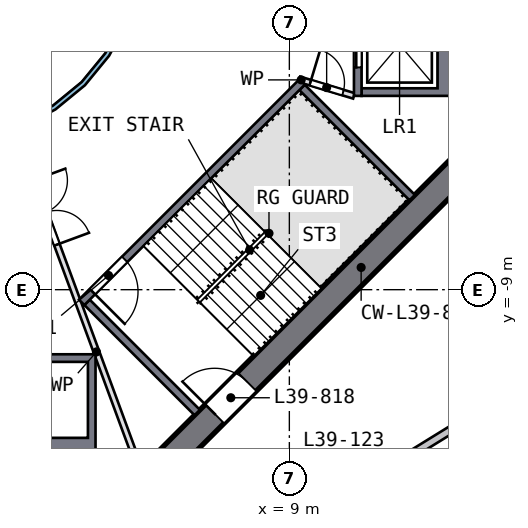
"""IFC4 building model, lengths in metres.
Left out: names, types, materials, properties, quantities, classifications, styles, units other than length and angle.
Written with IfcOpenShell. Run it as: python <this file> out.ifc"""

import sys

from ifc_helpers import new_model, si_unit, direction, frame, frame_2d, origin, place, context, subcontext, project, spatial, polyline, rectangle, outline, extrude, element, fill, save


model = new_model("IFC4")
c1 = context("Model", 3, precision=1e-05, world=origin(), true_north=direction((0.0, 1.0)))
c2 = subcontext(c1, "Body", "Model", "MODEL_VIEW")
j1 = project(units=[si_unit("LENGTHUNIT", "METRE"), si_unit("PLANEANGLEUNIT", "RADIAN")], contexts=[c1])
p1 = place(None, origin())
s1 = spatial("IfcSite", under=j1, at=p1, CompositionType="ELEMENT")
p2 = place(p1, origin())
s2 = spatial("IfcBuilding", under=s1, at=p2, CompositionType="ELEMENT")
p3 = place(p2, frame((0.0, 0.0, 162.0)))
s3 = spatial("IfcBuildingStorey", under=s2, at=p3, CompositionType="ELEMENT", Elevation=162.0)
p4 = place(p3, frame((5.552, -13.752, 0.0), z_axis=(0.0, 0.0, 1.0), x_axis=(0.707106781, 0.707106781, 0.0)))
e1 = element("IfcWall", 1, at=p4, inside=s3, PredefinedType="SHEAR", context=c2, shape_type="SweptSolid", body=[
    extrude(rectangle(XDim=11.598, YDim=0.7, at=frame_2d((5.799, 0.0))), origin(), (0.0, 0.0, 1.0), 3.5),
])
p5 = place(p4, frame((2.099, 0.0, 0.0)))
e2 = element("IfcOpeningElement", 2, at=p5, cuts=e1, PredefinedType="OPENING", context=c2, shape_type="SweptSolid", body=[
    extrude(rectangle(XDim=1.2, YDim=2.1, at=frame_2d((0.6, 1.05))), frame((0.0, 0.36, 0.0), z_axis=(0.0, -1.0, 0.0), x_axis=(1.0, 0.0, 0.0)), (0.0, 0.0, 1.0), 0.72),
])
p6 = place(p3, origin())
e3 = element("IfcWall", 3, at=p6, inside=s3, PredefinedType="SOLIDWALL", context=c2, shape_type="SweptSolid", body=[
    extrude(outline(polyline([(13.3, -3.9), (10.9, -3.9), (10.9, -3.7), (12.9, -3.7), (12.9, -1.4), (10.9, -1.4), (10.9, -1.2), (13.3, -1.2), (13.3, -3.9)])), origin(), (0.0, 0.0, 1.0), 3.19),
])
p7 = place(p3, frame((10.8, -1.2, 0.0), z_axis=(0.0, 0.0, 1.0), x_axis=(0.0, -1.0, 0.0)))
e4 = element("IfcWall", 4, at=p7, inside=s3, PredefinedType="SOLIDWALL", context=c2, shape_type="SweptSolid", body=[
    extrude(rectangle(XDim=2.7, YDim=0.2, at=frame_2d((1.35, 0.0))), origin(), (0.0, 0.0, 1.0), 3.19),
])
p8 = place(p7, frame((0.75, 0.0, 0.0)))
e5 = element("IfcOpeningElement", 5, at=p8, cuts=e4, PredefinedType="OPENING", context=c2, shape_type="SweptSolid", body=[
    extrude(rectangle(XDim=1.2, YDim=2.1, at=frame_2d((0.6, 1.05))), frame((0.0, 0.11, 0.0), z_axis=(0.0, -1.0, 0.0), x_axis=(1.0, 0.0, 0.0)), (0.0, 0.0, 1.0), 0.22),
])
p9 = place(p3, origin())
e6 = element("IfcWall", 6, at=p9, inside=s3, PredefinedType="SOLIDWALL", context=c2, shape_type="SweptSolid", body=[
    extrude(outline(polyline([(3.9, -10.7), (3.9, -13.3), (1.2, -13.3), (1.2, -10.7), (3.9, -10.7)]), holes=[polyline([(1.4, -12.9), (3.7, -12.9), (3.7, -10.9), (1.4, -10.9), (1.4, -12.9)])]), origin(), (0.0, 0.0, 1.0), 3.19),
])
p10 = place(p3, frame((9.334, -3.535, 0.0), z_axis=(0.0, 0.0, 1.0), x_axis=(-0.707106781, -0.707106781, 0.0)))
e7 = element("IfcWall", 7, at=p10, inside=s3, PredefinedType="SOLIDWALL", context=c2, shape_type="SweptSolid", body=[
    extrude(rectangle(XDim=8.2, YDim=0.2, at=frame_2d((4.1, 0.0))), origin(), (0.0, 0.0, 1.0), 3.19),
])
p11 = place(p10, frame((6.6, 0.0, 0.0)))
e8 = element("IfcOpeningElement", 8, at=p11, cuts=e7, PredefinedType="OPENING", context=c2, shape_type="SweptSolid", body=[
    extrude(rectangle(XDim=1.2, YDim=2.1, at=frame_2d((0.6, 1.05))), frame((0.0, 0.11, 0.0), z_axis=(0.0, -1.0, 0.0), x_axis=(1.0, 0.0, 0.0)), (0.0, 0.0, 1.0), 0.22),
])
for number, where, z_axis, x_axis in (
    (9, (3.677, -9.334, 0.0), (0.0, 0.0, 1.0), (0.707, -0.707, 0.0)),
    (10, (9.334, -3.677, 0.0), (0.0, 0.0, 1.0), (0.707, -0.707, 0.0)),
):
    element("IfcWall", number, at=place(p3, frame(where, z_axis=z_axis, x_axis=x_axis)), inside=s3, PredefinedType="SOLIDWALL", context=c2, shape_type="SweptSolid", body=[
        extrude(rectangle(XDim=4.1, YDim=0.2, at=frame_2d((2.05, 0.0))), origin(), (0.0, 0.0, 1.0), 3.19),
    ])
p12 = place(p3, frame((9.263, -3.465, 0.0), z_axis=(0.0, 0.0, 1.0), x_axis=(0.957084567, -0.289808785, 0.0)))
e11 = element("IfcWall", 11, at=p12, inside=s3, PredefinedType="PARTITIONING", context=c2, shape_type="SweptSolid", body=[
    extrude(rectangle(XDim=1.501, YDim=0.15, at=frame_2d((0.75, 0.0))), origin(), (0.0, 0.0, 1.0), 3.19),
])
p13 = place(p12, frame((0.301, 0.0, 0.0)))
e12 = element("IfcOpeningElement", 12, at=p13, cuts=e11, PredefinedType="OPENING", context=c2, shape_type="SweptSolid", body=[
    extrude(rectangle(XDim=0.9, YDim=2.1, at=frame_2d((0.45, 1.05))), frame((0.0, 0.085, 0.0), z_axis=(0.0, -1.0, 0.0), x_axis=(1.0, 0.0, 0.0)), (0.0, 0.0, 1.0), 0.17),
])
p14 = place(p3, frame((1.776, -4.813, 0.0), z_axis=(0.0, 0.0, 1.0), x_axis=(0.346109381, -0.938194168, 0.0)))
e13 = element("IfcWall", 13, at=p14, inside=s3, PredefinedType="PARTITIONING", context=c2, shape_type="SweptSolid", body=[
    extrude(rectangle(XDim=9.016, YDim=0.15, at=frame_2d((4.508, 0.0))), origin(), (0.0, 0.0, 1.0), 3.19),
])
p15 = place(p14, frame((1.4, 0.0, 0.0)))
e14 = element("IfcOpeningElement", 14, at=p15, cuts=e13, PredefinedType="OPENING", context=c2, shape_type="SweptSolid", body=[
    extrude(rectangle(XDim=1.8, YDim=2.1, at=frame_2d((0.9, 1.05))), frame((0.0, 0.085, 0.0), z_axis=(0.0, -1.0, 0.0), x_axis=(1.0, 0.0, 0.0)), (0.0, 0.0, 1.0), 0.17),
])
p16 = place(p3, origin())
e15 = element("IfcWall", 15, at=p16, inside=s3, PredefinedType="SOLIDWALL", context=c2, shape_type="SweptSolid", body=[
    extrude(outline(polyline([(5.021, -0.999), (4.73, -1.959), (4.257, -2.844), (3.62, -3.62), (2.844, -4.257), (1.959, -4.73), (0.999, -5.021), (0.0, -5.12), (-0.999, -5.021), (-1.959, -4.73), (-2.844, -4.257), (-3.62, -3.62), (-4.257, -2.844), (-4.73, -1.959), (-5.021, -0.999), (-5.12, 0.0), (-5.021, 0.999), (-4.73, 1.959), (-4.257, 2.844), (-3.62, 3.62), (-2.844, 4.257), (-1.959, 4.73), (-0.999, 5.021), (0.0, 5.12), (0.999, 5.021), (1.959, 4.73), (2.844, 4.257), (3.62, 3.62), (4.257, 2.844), (4.73, 1.959), (5.021, 0.999), (5.12, 0.0), (5.021, -0.999)]), holes=[polyline([(4.904, 0.976), (4.619, 1.913), (4.157, 2.778), (3.535, 3.535), (2.778, 4.157), (1.913, 4.619), (0.976, 4.904), (0.0, 5.0), (-0.976, 4.904), (-1.913, 4.619), (-2.778, 4.157), (-3.535, 3.535), (-4.157, 2.778), (-4.619, 1.913), (-4.904, 0.976), (-5.0, 0.0), (-4.904, -0.976), (-4.619, -1.913), (-4.157, -2.778), (-3.535, -3.535), (-2.778, -4.157), (-1.913, -4.619), (-0.976, -4.904), (0.0, -5.0), (0.976, -4.904), (1.913, -4.619), (2.778, -4.157), (3.535, -3.535), (4.157, -2.778), (4.619, -1.913), (4.904, -0.976), (5.0, 0.0), (4.904, 0.976)])]), origin(), (0.0, 0.0, 1.0), 3.19),
])
p17 = place(p3, frame((13.375, -12.613, 0.0), z_axis=(0.0, 0.0, 1.0), x_axis=(-0.850995395, -0.52517315, 0.0)))
e16 = element("IfcWall", 16, at=p17, inside=s3, PredefinedType="SOLIDWALL", context=c2, shape_type="SweptSolid", body=[
    extrude(rectangle(XDim=9.316, YDim=0.2, at=frame_2d((4.658, 0.0))), origin(), (0.0, 0.0, 1.0), 3.19),
])
p18 = place(p17, frame((1.9, 0.0, 0.0)))
e17 = element("IfcOpeningElement", 17, at=p18, cuts=e16, PredefinedType="OPENING", context=c2, shape_type="SweptSolid", body=[
    extrude(rectangle(XDim=1.0, YDim=2.1, at=frame_2d((0.5, 1.05))), frame((0.0, 0.11, 0.0), z_axis=(0.0, -1.0, 0.0), x_axis=(1.0, 0.0, 0.0)), (0.0, 0.0, 1.0), 0.22),
])
p19 = place(p8, origin())
e18 = element("IfcDoor", 18, at=p19, inside=s3, OperationType="DOUBLE_DOOR_SLIDING", PredefinedType="DOOR", context=c2, shape_type="SweptSolid", body=[
    extrude(rectangle(XDim=1.2, YDim=2.1, at=frame_2d((0.6, 1.05))), frame((0.0, 0.025, 0.0), z_axis=(0.0, -1.0, 0.0), x_axis=(1.0, 0.0, 0.0)), (0.0, 0.0, 1.0), 0.05),
])
fill(e5, e18)
p20 = place(p11, origin())
e19 = element("IfcDoor", 19, at=p20, inside=s3, OperationType="SINGLE_SWING_RIGHT", PredefinedType="DOOR", context=c2, shape_type="SweptSolid", body=[
    extrude(rectangle(XDim=1.2, YDim=2.1, at=frame_2d((0.6, 1.05))), frame((0.0, 0.025, 0.0), z_axis=(0.0, -1.0, 0.0), x_axis=(1.0, 0.0, 0.0)), (0.0, 0.0, 1.0), 0.05),
])
fill(e8, e19)
p21 = place(p5, origin())
e20 = element("IfcDoor", 20, at=p21, inside=s3, OperationType="SINGLE_SWING_LEFT", PredefinedType="DOOR", context=c2, shape_type="SweptSolid", body=[
    extrude(rectangle(XDim=1.2, YDim=2.1, at=frame_2d((0.6, 1.05))), frame((0.0, 0.025, 0.0), z_axis=(0.0, -1.0, 0.0), x_axis=(1.0, 0.0, 0.0)), (0.0, 0.0, 1.0), 0.05),
])
fill(e2, e20)
p22 = place(p13, origin())
e21 = element("IfcDoor", 21, at=p22, inside=s3, OperationType="SINGLE_SWING_LEFT", PredefinedType="DOOR", context=c2, shape_type="SweptSolid", body=[
    extrude(rectangle(XDim=0.9, YDim=2.1, at=frame_2d((0.45, 1.05))), frame((0.0, 0.025, 0.0), z_axis=(0.0, -1.0, 0.0), x_axis=(1.0, 0.0, 0.0)), (0.0, 0.0, 1.0), 0.05),
])
fill(e12, e21)
p23 = place(p15, origin())
e22 = element("IfcDoor", 22, at=p23, inside=s3, OperationType="DOUBLE_DOOR_SINGLE_SWING", PredefinedType="DOOR", context=c2, shape_type="SweptSolid", body=[
    extrude(rectangle(XDim=1.8, YDim=2.1, at=frame_2d((0.9, 1.05))), frame((0.0, 0.025, 0.0), z_axis=(0.0, -1.0, 0.0), x_axis=(1.0, 0.0, 0.0)), (0.0, 0.0, 1.0), 0.05),
])
fill(e14, e22)
save(model, sys.argv[1])
